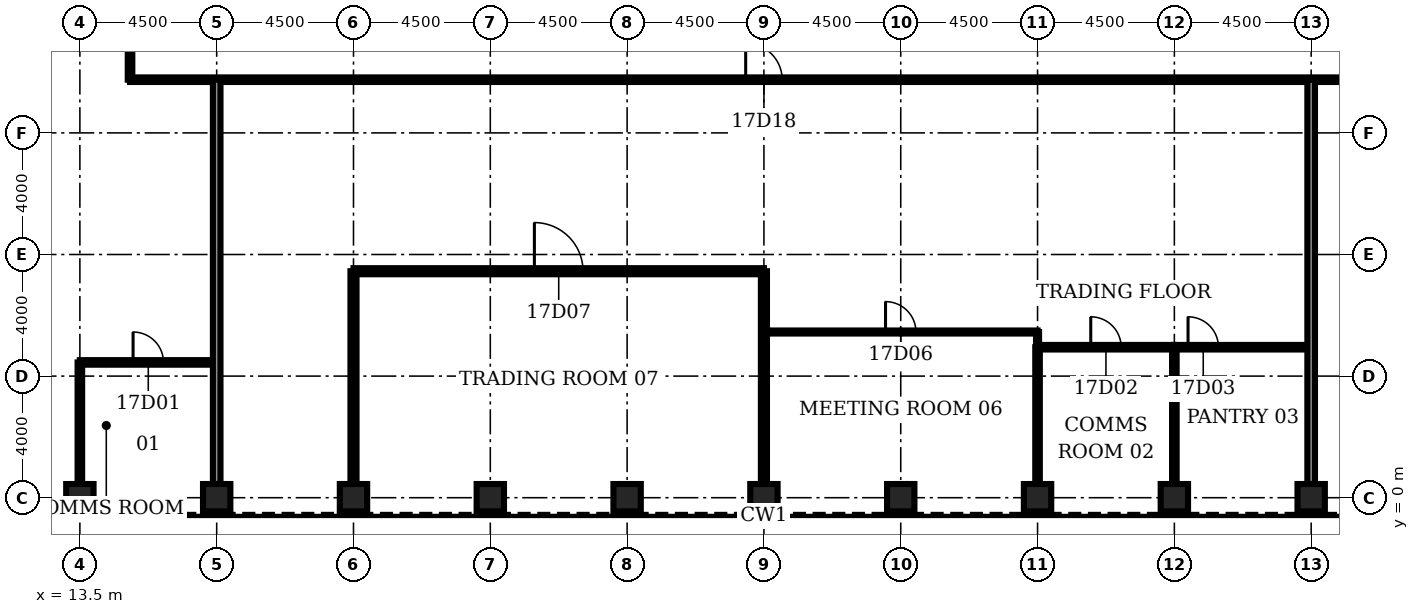
"""IFC4 building model, lengths in metres.
Left out: names, types, materials, properties, quantities, classifications, styles, units other than length and angle.
Written with IfcOpenShell. Run it as: python <this file> out.ifc"""

import sys

from ifc_helpers import new_model, si_unit, direction, frame, frame_2d, origin, origin_2d, place, context, subcontext, project, spatial, rectangle, hollow_rectangle, extrude, element, fill, save


model = new_model("IFC4")
c1 = context("Model", 3, precision=1e-05, world=origin(), true_north=direction((0.0, 1.0)))
c2 = subcontext(c1, "Body", "Model", "MODEL_VIEW")
j1 = project(units=[si_unit("LENGTHUNIT", "METRE"), si_unit("PLANEANGLEUNIT", "RADIAN")], contexts=[c1])
p1 = place(None, origin())
s1 = spatial("IfcSite", under=j1, at=p1, CompositionType="ELEMENT")
p2 = place(p1, origin())
s2 = spatial("IfcBuilding", under=s1, at=p2, CompositionType="ELEMENT")
p3 = place(p2, frame((0.0, 0.0, 81.5)))
s3 = spatial("IfcBuildingStorey", under=s2, at=p3, CompositionType="ELEMENT", Elevation=81.5)
for number, where, z_axis, x_axis in (
    (1, (13.5, 0.0, 0.0), (0.0, 0.0, 1.0), (0.0, 1.0, 0.0)),
    (2, (18.0, 0.0, 0.0), (0.0, 0.0, 1.0), (0.0, 1.0, 0.0)),
    (3, (22.5, 0.0, 0.0), (0.0, 0.0, 1.0), (0.0, 1.0, 0.0)),
    (4, (27.0, 0.0, 0.0), (0.0, 0.0, 1.0), (0.0, 1.0, 0.0)),
    (5, (31.5, 0.0, 0.0), (0.0, 0.0, 1.0), (0.0, 1.0, 0.0)),
    (6, (36.0, 0.0, 0.0), (0.0, 0.0, 1.0), (0.0, 1.0, 0.0)),
    (7, (40.5, 0.0, 0.0), (0.0, 0.0, 1.0), (0.0, 1.0, 0.0)),
    (8, (45.0, 0.0, 0.0), (0.0, 0.0, 1.0), (0.0, 1.0, 0.0)),
    (9, (49.5, 0.0, 0.0), (0.0, 0.0, 1.0), (0.0, 1.0, 0.0)),
    (10, (54.0, 0.0, 0.0), (0.0, 0.0, 1.0), (0.0, 1.0, 0.0)),
):
    element("IfcColumn", number, at=place(p3, frame(where, z_axis=z_axis, x_axis=x_axis)), inside=s3, PredefinedType="COLUMN", context=c2, shape_type="SweptSolid", body=[
        extrude(hollow_rectangle(XDim=0.9, YDim=0.9, WallThickness=0.11, at=origin_2d()), origin(), (0.0, 0.0, 1.0), 4.5),
    ])
p4 = place(p3, frame((13.5, 4.45, 0.0), z_axis=(0.0, 0.0, 1.0), x_axis=(1.0, 0.0, 0.0)))
e11 = element("IfcWall", 11, at=p4, inside=s3, PredefinedType="PARTITIONING", context=c2, shape_type="SweptSolid", body=[
    extrude(rectangle(XDim=4.5, YDim=0.15, at=frame_2d((2.25, 0.0))), origin(), (0.0, 0.0, 1.0), 3.0),
])
p5 = place(p4, frame((1.75, 0.0, 0.0)))
e12 = element("IfcOpeningElement", 12, at=p5, cuts=e11, PredefinedType="OPENING", context=c2, shape_type="SweptSolid", body=[
    extrude(rectangle(XDim=1.0, YDim=2.1, at=frame_2d((0.5, 1.05))), frame((0.0, 0.085, 0.0), z_axis=(0.0, -1.0, 0.0), x_axis=(1.0, 0.0, 0.0)), (0.0, 0.0, 1.0), 0.17),
])
p6 = place(p3, frame((45.0, 4.95, 0.0), z_axis=(0.0, 0.0, 1.0), x_axis=(1.0, 0.0, 0.0)))
e13 = element("IfcWall", 13, at=p6, inside=s3, PredefinedType="PARTITIONING", context=c2, shape_type="SweptSolid", body=[
    extrude(rectangle(XDim=4.5, YDim=0.15, at=frame_2d((2.25, 0.0))), origin(), (0.0, 0.0, 1.0), 3.0),
])
p7 = place(p6, frame((1.75, 0.0, 0.0)))
e14 = element("IfcOpeningElement", 14, at=p7, cuts=e13, PredefinedType="OPENING", context=c2, shape_type="SweptSolid", body=[
    extrude(rectangle(XDim=1.0, YDim=2.1, at=frame_2d((0.5, 1.05))), frame((0.0, 0.085, 0.0), z_axis=(0.0, -1.0, 0.0), x_axis=(1.0, 0.0, 0.0)), (0.0, 0.0, 1.0), 0.17),
])
p8 = place(p3, frame((49.5, 4.95, 0.0), z_axis=(0.0, 0.0, 1.0), x_axis=(1.0, 0.0, 0.0)))
e15 = element("IfcWall", 15, at=p8, inside=s3, PredefinedType="PARTITIONING", context=c2, shape_type="SweptSolid", body=[
    extrude(rectangle(XDim=4.5, YDim=0.15, at=frame_2d((2.25, 0.0))), origin(), (0.0, 0.0, 1.0), 3.0),
])
p9 = place(p8, frame((0.45, 0.0, 0.0)))
e16 = element("IfcOpeningElement", 16, at=p9, cuts=e15, PredefinedType="OPENING", context=c2, shape_type="SweptSolid", body=[
    extrude(rectangle(XDim=1.0, YDim=2.1, at=frame_2d((0.5, 1.05))), frame((0.0, 0.085, 0.0), z_axis=(0.0, -1.0, 0.0), x_axis=(1.0, 0.0, 0.0)), (0.0, 0.0, 1.0), 0.17),
])
p10 = place(p3, frame((36.0, 5.45, 0.0), z_axis=(0.0, 0.0, 1.0), x_axis=(1.0, 0.0, 0.0)))
e17 = element("IfcWall", 17, at=p10, inside=s3, PredefinedType="PARTITIONING", context=c2, shape_type="SweptSolid", body=[
    extrude(rectangle(XDim=9.0, YDim=0.1, at=frame_2d((4.5, 0.0))), origin(), (0.0, 0.0, 1.0), 3.0),
])
p11 = place(p10, frame((4.0, 0.0, 0.0)))
e18 = element("IfcOpeningElement", 18, at=p11, cuts=e17, PredefinedType="OPENING", context=c2, shape_type="SweptSolid", body=[
    extrude(rectangle(XDim=1.0, YDim=2.1, at=frame_2d((0.5, 1.05))), frame((0.0, 0.06, 0.0), z_axis=(0.0, -1.0, 0.0), x_axis=(1.0, 0.0, 0.0)), (0.0, 0.0, 1.0), 0.12),
])
p12 = place(p3, frame((22.5, 7.45, 0.0), z_axis=(0.0, 0.0, 1.0), x_axis=(1.0, 0.0, 0.0)))
e19 = element("IfcWall", 19, at=p12, inside=s3, PredefinedType="PARTITIONING", context=c2, shape_type="SweptSolid", body=[
    extrude(rectangle(XDim=13.5, YDim=0.2, at=frame_2d((6.75, 0.0))), origin(), (0.0, 0.0, 1.0), 3.0),
])
p13 = place(p12, frame((5.95, 0.0, 0.0)))
e20 = element("IfcOpeningElement", 20, at=p13, cuts=e19, PredefinedType="OPENING", context=c2, shape_type="SweptSolid", body=[
    extrude(rectangle(XDim=1.6, YDim=2.1, at=frame_2d((0.8, 1.05))), frame((0.0, 0.11, 0.0), z_axis=(0.0, -1.0, 0.0), x_axis=(1.0, 0.0, 0.0)), (0.0, 0.0, 1.0), 0.22),
])
p14 = place(p3, frame((15.15, 13.75, 0.0), z_axis=(0.0, 0.0, 1.0), x_axis=(1.0, 0.0, 0.0)))
e21 = element("IfcWall", 21, at=p14, inside=s3, PredefinedType="PARTITIONING", context=c2, shape_type="SweptSolid", body=[
    extrude(rectangle(XDim=41.7, YDim=0.15, at=frame_2d((20.85, 0.0))), origin(), (0.0, 0.0, 1.0), 3.0),
])
p15 = place(p14, frame((20.25, 0.0, 0.0)))
e22 = element("IfcOpeningElement", 22, at=p15, cuts=e21, PredefinedType="OPENING", context=c2, shape_type="SweptSolid", body=[
    extrude(rectangle(XDim=1.2, YDim=2.1, at=frame_2d((0.6, 1.05))), frame((0.0, 0.085, 0.0), z_axis=(0.0, -1.0, 0.0), x_axis=(1.0, 0.0, 0.0)), (0.0, 0.0, 1.0), 0.17),
])
p16 = place(p3, frame((13.5, 0.45, 0.0), z_axis=(0.0, 0.0, 1.0), x_axis=(0.0, 1.0, 0.0)))
e23 = element("IfcWall", 23, at=p16, inside=s3, PredefinedType="PARTITIONING", context=c2, shape_type="SweptSolid", body=[
    extrude(rectangle(XDim=4.0, YDim=0.15, at=frame_2d((2.0, 0.0))), origin(), (0.0, 0.0, 1.0), 3.0),
])
p17 = place(p3, frame((15.15, 13.75, 0.0), z_axis=(0.0, 0.0, 1.0), x_axis=(0.0, 1.0, 0.0)))
e24 = element("IfcWall", 24, at=p17, inside=s3, PredefinedType="PARTITIONING", context=c2, shape_type="SweptSolid", body=[
    extrude(rectangle(XDim=20.5, YDim=0.15, at=frame_2d((10.25, 0.0))), origin(), (0.0, 0.0, 1.0), 3.0),
])
p18 = place(p17, frame((9.65, 0.0, 0.0)))
e25 = element("IfcOpeningElement", 25, at=p18, cuts=e24, PredefinedType="OPENING", context=c2, shape_type="SweptSolid", body=[
    extrude(rectangle(XDim=1.2, YDim=2.1, at=frame_2d((0.6, 1.05))), frame((0.0, 0.085, 0.0), z_axis=(0.0, -1.0, 0.0), x_axis=(1.0, 0.0, 0.0)), (0.0, 0.0, 1.0), 0.17),
])
p19 = place(p3, frame((18.0, 0.45, 0.0), z_axis=(0.0, 0.0, 1.0), x_axis=(0.0, 1.0, 0.0)))
e26 = element("IfcWall", 26, at=p19, inside=s3, PredefinedType="PARTITIONING", context=c2, shape_type="SweptSolid", body=[
    extrude(rectangle(XDim=13.3, YDim=0.25, at=frame_2d((6.65, 0.0))), origin(), (0.0, 0.0, 1.0), 3.0),
])
for number, where, z_axis, x_axis in (
    (27, (22.5, 0.45, 0.0), (0.0, 0.0, 1.0), (0.0, 1.0, 0.0)),
    (28, (36.0, 0.45, 0.0), (0.0, 0.0, 1.0), (0.0, 1.0, 0.0)),
):
    element("IfcWall", number, at=place(p3, frame(where, z_axis=z_axis, x_axis=x_axis)), inside=s3, PredefinedType="PARTITIONING", context=c2, shape_type="SweptSolid", body=[
        extrude(rectangle(XDim=7.0, YDim=0.2, at=frame_2d((3.5, 0.0))), origin(), (0.0, 0.0, 1.0), 3.0),
    ])
p20 = place(p3, frame((45.0, 0.45, 0.0), z_axis=(0.0, 0.0, 1.0), x_axis=(0.0, 1.0, 0.0)))
e29 = element("IfcWall", 29, at=p20, inside=s3, PredefinedType="PARTITIONING", context=c2, shape_type="SweptSolid", body=[
    extrude(rectangle(XDim=4.5, YDim=0.15, at=frame_2d((2.25, 0.0))), origin(), (0.0, 0.0, 1.0), 3.0),
])
p21 = place(p3, frame((45.0, 4.95, 0.0), z_axis=(0.0, 0.0, 1.0), x_axis=(0.0, 1.0, 0.0)))
e30 = element("IfcWall", 30, at=p21, inside=s3, PredefinedType="PARTITIONING", context=c2, shape_type="SweptSolid", body=[
    extrude(rectangle(XDim=0.5, YDim=0.1, at=frame_2d((0.25, 0.0))), origin(), (0.0, 0.0, 1.0), 3.0),
])
p22 = place(p3, frame((49.5, 0.45, 0.0), z_axis=(0.0, 0.0, 1.0), x_axis=(0.0, 1.0, 0.0)))
e31 = element("IfcWall", 31, at=p22, inside=s3, PredefinedType="PARTITIONING", context=c2, shape_type="SweptSolid", body=[
    extrude(rectangle(XDim=4.5, YDim=0.15, at=frame_2d((2.25, 0.0))), origin(), (0.0, 0.0, 1.0), 3.0),
])
p23 = place(p3, frame((54.0, 0.45, 0.0), z_axis=(0.0, 0.0, 1.0), x_axis=(0.0, 1.0, 0.0)))
e32 = element("IfcWall", 32, at=p23, inside=s3, PredefinedType="PARTITIONING", context=c2, shape_type="SweptSolid", body=[
    extrude(rectangle(XDim=13.3, YDim=0.25, at=frame_2d((6.65, 0.0))), origin(), (0.0, 0.0, 1.0), 3.0),
])
p24 = place(p5, origin())
e33 = element("IfcDoor", 33, at=p24, inside=s3, OperationType="SINGLE_SWING_LEFT", PredefinedType="DOOR", context=c2, shape_type="SweptSolid", body=[
    extrude(rectangle(XDim=1.0, YDim=2.1, at=frame_2d((0.5, 1.05))), frame((0.0, 0.025, 0.0), z_axis=(0.0, -1.0, 0.0), x_axis=(1.0, 0.0, 0.0)), (0.0, 0.0, 1.0), 0.05),
])
fill(e12, e33)
p25 = place(p7, origin())
e34 = element("IfcDoor", 34, at=p25, inside=s3, OperationType="SINGLE_SWING_LEFT", PredefinedType="DOOR", context=c2, shape_type="SweptSolid", body=[
    extrude(rectangle(XDim=1.0, YDim=2.1, at=frame_2d((0.5, 1.05))), frame((0.0, 0.025, 0.0), z_axis=(0.0, -1.0, 0.0), x_axis=(1.0, 0.0, 0.0)), (0.0, 0.0, 1.0), 0.05),
])
fill(e14, e34)
p26 = place(p9, origin())
e35 = element("IfcDoor", 35, at=p26, inside=s3, OperationType="SINGLE_SWING_LEFT", PredefinedType="DOOR", context=c2, shape_type="SweptSolid", body=[
    extrude(rectangle(XDim=1.0, YDim=2.1, at=frame_2d((0.5, 1.05))), frame((0.0, 0.025, 0.0), z_axis=(0.0, -1.0, 0.0), x_axis=(1.0, 0.0, 0.0)), (0.0, 0.0, 1.0), 0.05),
])
fill(e16, e35)
p27 = place(p11, origin())
e36 = element("IfcDoor", 36, at=p27, inside=s3, OperationType="SINGLE_SWING_LEFT", PredefinedType="DOOR", context=c2, shape_type="SweptSolid", body=[
    extrude(rectangle(XDim=1.0, YDim=2.1, at=frame_2d((0.5, 1.05))), frame((0.0, 0.025, 0.0), z_axis=(0.0, -1.0, 0.0), x_axis=(1.0, 0.0, 0.0)), (0.0, 0.0, 1.0), 0.05),
])
fill(e18, e36)
p28 = place(p13, origin())
e37 = element("IfcDoor", 37, at=p28, inside=s3, OperationType="SINGLE_SWING_LEFT", PredefinedType="DOOR", context=c2, shape_type="SweptSolid", body=[
    extrude(rectangle(XDim=1.6, YDim=2.1, at=frame_2d((0.8, 1.05))), frame((0.0, 0.025, 0.0), z_axis=(0.0, -1.0, 0.0), x_axis=(1.0, 0.0, 0.0)), (0.0, 0.0, 1.0), 0.05),
])
fill(e20, e37)
p29 = place(p15, origin())
e38 = element("IfcDoor", 38, at=p29, inside=s3, OperationType="SINGLE_SWING_LEFT", PredefinedType="DOOR", context=c2, shape_type="SweptSolid", body=[
    extrude(rectangle(XDim=1.2, YDim=2.1, at=frame_2d((0.6, 1.05))), frame((0.0, 0.025, 0.0), z_axis=(0.0, -1.0, 0.0), x_axis=(1.0, 0.0, 0.0)), (0.0, 0.0, 1.0), 0.05),
])
fill(e22, e38)
save(model, sys.argv[1])
